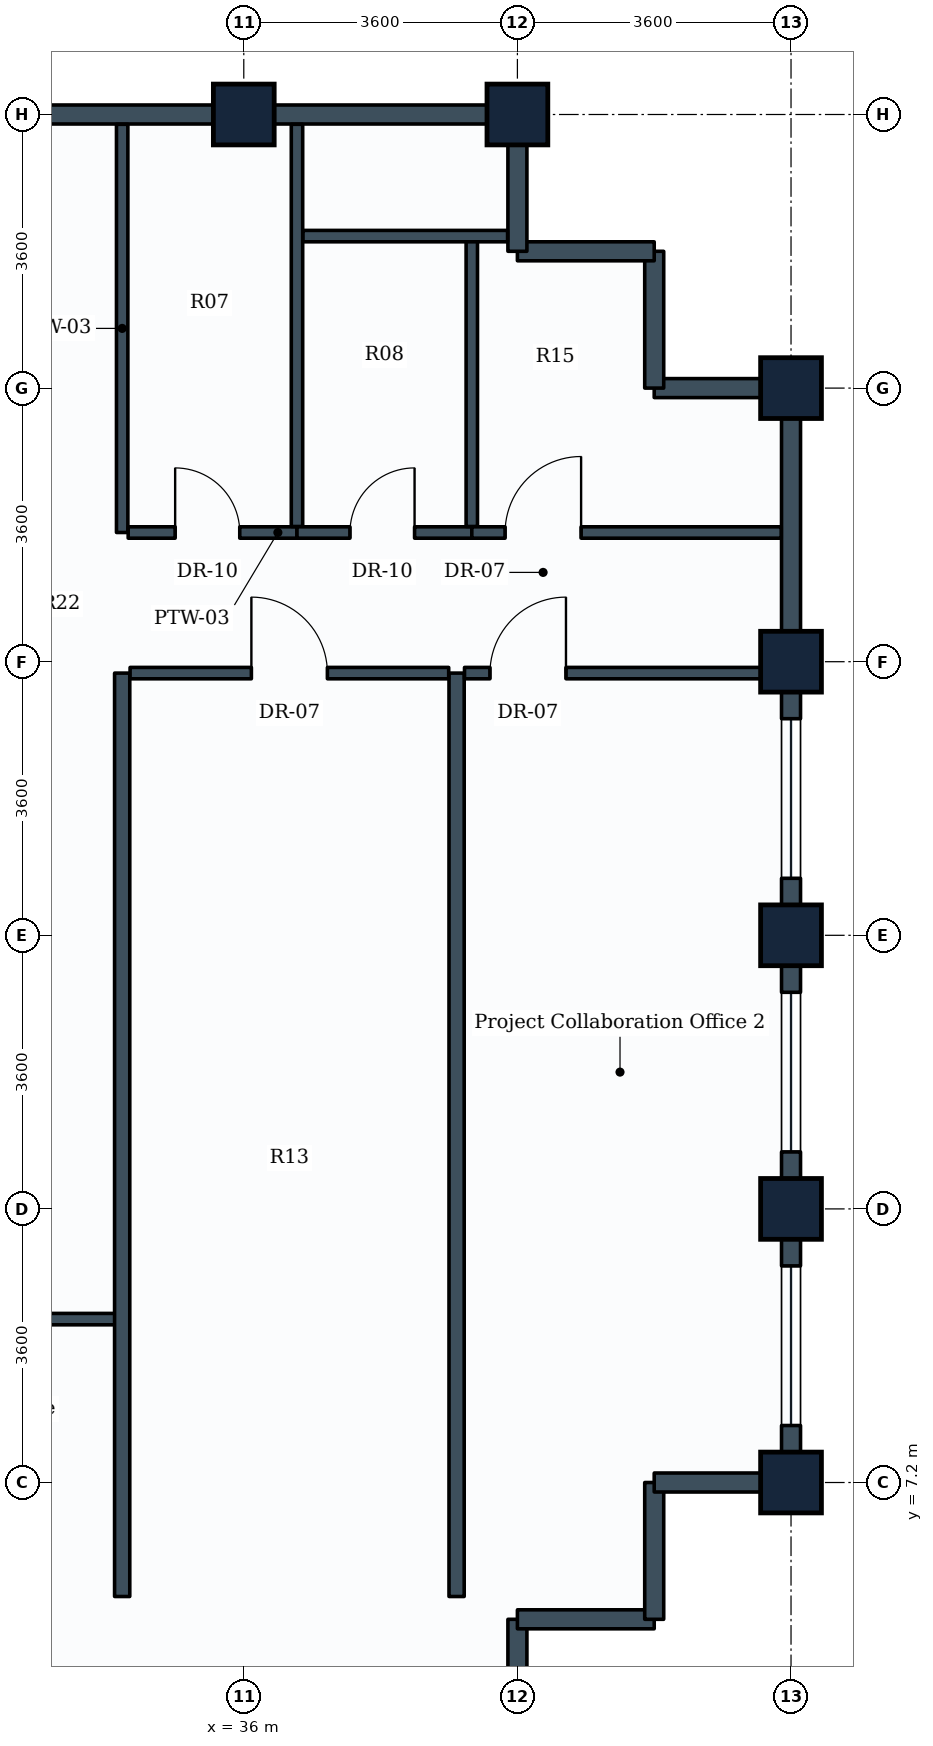
"""IFC4 building model, lengths in metres.
Left out: names, types, materials, properties, quantities, classifications, styles, units other than length and angle.
Written with IfcOpenShell. Run it as: python <this file> out.ifc"""

import sys

from ifc_helpers import new_model, si_unit, direction, frame, frame_2d, origin, origin_2d, place, context, subcontext, project, spatial, rectangle, extrude, element, fill, save


model = new_model("IFC4")
c1 = context("Model", 3, precision=1e-05, world=origin(), true_north=direction((0.0, 1.0)))
c2 = subcontext(c1, "Body", "Model", "MODEL_VIEW")
j1 = project(units=[si_unit("LENGTHUNIT", "METRE"), si_unit("PLANEANGLEUNIT", "RADIAN")], contexts=[c1])
p1 = place(None, origin())
s1 = spatial("IfcSite", under=j1, at=p1, CompositionType="ELEMENT")
p2 = place(p1, origin())
s2 = spatial("IfcBuilding", under=s1, at=p2, CompositionType="ELEMENT")
p3 = place(p2, frame((0.0, 0.0, 277.4)))
s3 = spatial("IfcBuildingStorey", under=s2, at=p3, CompositionType="ELEMENT", Elevation=277.4)
for number, where, z_axis, x_axis in (
    (1, (36.0, 25.2, 0.0), (0.0, 0.0, 1.0), (1.0, 0.0, 0.0)),
    (2, (39.6, 25.2, 0.0), (0.0, 0.0, 1.0), (1.0, 0.0, 0.0)),
    (3, (43.2, 7.2, 0.0), (0.0, 0.0, 1.0), (1.0, 0.0, 0.0)),
    (4, (43.2, 10.8, 0.0), (0.0, 0.0, 1.0), (0.0, 1.0, 0.0)),
    (5, (43.2, 14.4, 0.0), (0.0, 0.0, 1.0), (0.0, 1.0, 0.0)),
    (6, (43.2, 18.0, 0.0), (0.0, 0.0, 1.0), (0.0, 1.0, 0.0)),
    (7, (43.2, 21.6, 0.0), (0.0, 0.0, 1.0), (0.0, 1.0, 0.0)),
):
    element("IfcColumn", number, at=place(p3, frame(where, z_axis=z_axis, x_axis=x_axis)), inside=s3, PredefinedType="COLUMN", context=c2, shape_type="SweptSolid", body=[
        extrude(rectangle(XDim=0.8, YDim=0.8, at=origin_2d()), origin(), (0.0, 0.0, 1.0), 3.6),
    ])
p4 = place(p3, frame((39.6, 5.4, 0.0), z_axis=(0.0, 0.0, 1.0), x_axis=(0.0, -1.0, 0.0)))
e8 = element("IfcWall", 8, at=p4, inside=s3, PredefinedType="STANDARD", context=c2, shape_type="SweptSolid", body=[
    extrude(rectangle(XDim=1.8, YDim=0.25, at=frame_2d((0.9, 0.0))), origin(), (0.0, 0.0, 1.0), 2.83),
])
p5 = place(p3, frame((41.4, 5.4, 0.0), z_axis=(0.0, 0.0, 1.0), x_axis=(-1.0, 0.0, 0.0)))
e9 = element("IfcWall", 9, at=p5, inside=s3, PredefinedType="STANDARD", context=c2, shape_type="SweptSolid", body=[
    extrude(rectangle(XDim=1.8, YDim=0.25, at=frame_2d((0.9, 0.0))), origin(), (0.0, 0.0, 1.0), 3.335),
])
p6 = place(p3, frame((41.4, 7.2, 0.0), z_axis=(0.0, 0.0, 1.0), x_axis=(0.0, -1.0, 0.0)))
e10 = element("IfcWall", 10, at=p6, inside=s3, PredefinedType="STANDARD", context=c2, shape_type="SweptSolid", body=[
    extrude(rectangle(XDim=1.8, YDim=0.25, at=frame_2d((0.9, 0.0))), origin(), (0.0, 0.0, 1.0), 3.335),
])
p7 = place(p3, frame((43.2, 7.2, 0.0), z_axis=(0.0, 0.0, 1.0), x_axis=(-1.0, 0.0, 0.0)))
e11 = element("IfcWall", 11, at=p7, inside=s3, PredefinedType="STANDARD", context=c2, shape_type="SweptSolid", body=[
    extrude(rectangle(XDim=1.8, YDim=0.25, at=frame_2d((0.9, 0.0))), origin(), (0.0, 0.0, 1.0), 2.83),
])
p8 = place(p3, frame((43.2, 10.8, 0.0), z_axis=(0.0, 0.0, 1.0), x_axis=(0.0, -1.0, 0.0)))
e12 = element("IfcWall", 12, at=p8, inside=s3, PredefinedType="STANDARD", context=c2, shape_type="SweptSolid", body=[
    extrude(rectangle(XDim=3.6, YDim=0.25, at=frame_2d((1.8, 0.0))), origin(), (0.0, 0.0, 1.0), 2.83),
])
p9 = place(p8, frame((0.75, 0.0, 0.85)))
e13 = element("IfcOpeningElement", 13, at=p9, cuts=e12, PredefinedType="OPENING", context=c2, shape_type="SweptSolid", body=[
    extrude(rectangle(XDim=2.1, YDim=1.35, at=frame_2d((1.05, 0.675))), frame((0.0, 0.135, 0.0), z_axis=(0.0, -1.0, 0.0), x_axis=(1.0, 0.0, 0.0)), (0.0, 0.0, 1.0), 0.27),
])
p10 = place(p3, frame((43.2, 14.4, 0.0), z_axis=(0.0, 0.0, 1.0), x_axis=(0.0, -1.0, 0.0)))
e14 = element("IfcWall", 14, at=p10, inside=s3, PredefinedType="STANDARD", context=c2, shape_type="SweptSolid", body=[
    extrude(rectangle(XDim=3.6, YDim=0.25, at=frame_2d((1.8, 0.0))), origin(), (0.0, 0.0, 1.0), 2.83),
])
p11 = place(p10, frame((0.75, 0.0, 0.85)))
e15 = element("IfcOpeningElement", 15, at=p11, cuts=e14, PredefinedType="OPENING", context=c2, shape_type="SweptSolid", body=[
    extrude(rectangle(XDim=2.1, YDim=1.35, at=frame_2d((1.05, 0.675))), frame((0.0, 0.135, 0.0), z_axis=(0.0, -1.0, 0.0), x_axis=(1.0, 0.0, 0.0)), (0.0, 0.0, 1.0), 0.27),
])
p12 = place(p3, frame((43.2, 18.0, 0.0), z_axis=(0.0, 0.0, 1.0), x_axis=(0.0, -1.0, 0.0)))
e16 = element("IfcWall", 16, at=p12, inside=s3, PredefinedType="STANDARD", context=c2, shape_type="SweptSolid", body=[
    extrude(rectangle(XDim=3.6, YDim=0.25, at=frame_2d((1.8, 0.0))), origin(), (0.0, 0.0, 1.0), 2.83),
])
p13 = place(p12, frame((0.75, 0.0, 0.85)))
e17 = element("IfcOpeningElement", 17, at=p13, cuts=e16, PredefinedType="OPENING", context=c2, shape_type="SweptSolid", body=[
    extrude(rectangle(XDim=2.1, YDim=1.35, at=frame_2d((1.05, 0.675))), frame((0.0, 0.135, 0.0), z_axis=(0.0, -1.0, 0.0), x_axis=(1.0, 0.0, 0.0)), (0.0, 0.0, 1.0), 0.27),
])
p14 = place(p3, frame((43.2, 21.6, 0.0), z_axis=(0.0, 0.0, 1.0), x_axis=(0.0, -1.0, 0.0)))
e18 = element("IfcWall", 18, at=p14, inside=s3, PredefinedType="STANDARD", context=c2, shape_type="SweptSolid", body=[
    extrude(rectangle(XDim=3.6, YDim=0.25, at=frame_2d((1.8, 0.0))), origin(), (0.0, 0.0, 1.0), 2.83),
])
p15 = place(p3, frame((41.4, 21.6, 0.0), z_axis=(0.0, 0.0, 1.0), x_axis=(1.0, 0.0, 0.0)))
e19 = element("IfcWall", 19, at=p15, inside=s3, PredefinedType="STANDARD", context=c2, shape_type="SweptSolid", body=[
    extrude(rectangle(XDim=1.8, YDim=0.25, at=frame_2d((0.9, 0.0))), origin(), (0.0, 0.0, 1.0), 2.83),
])
for number, where, z_axis, x_axis in (
    (20, (41.4, 23.4, 0.0), (0.0, 0.0, 1.0), (0.0, -1.0, 0.0)),
    (21, (39.6, 23.4, 0.0), (0.0, 0.0, 1.0), (1.0, 0.0, 0.0)),
):
    element("IfcWall", number, at=place(p3, frame(where, z_axis=z_axis, x_axis=x_axis)), inside=s3, PredefinedType="STANDARD", context=c2, shape_type="SweptSolid", body=[
        extrude(rectangle(XDim=1.8, YDim=0.25, at=frame_2d((0.9, 0.0))), origin(), (0.0, 0.0, 1.0), 3.335),
    ])
p16 = place(p3, frame((39.6, 25.2, 0.0), z_axis=(0.0, 0.0, 1.0), x_axis=(0.0, -1.0, 0.0)))
e22 = element("IfcWall", 22, at=p16, inside=s3, PredefinedType="STANDARD", context=c2, shape_type="SweptSolid", body=[
    extrude(rectangle(XDim=1.8, YDim=0.25, at=frame_2d((0.9, 0.0))), origin(), (0.0, 0.0, 1.0), 2.83),
])
for number, where, z_axis, x_axis in (
    (23, (36.0, 25.2, 0.0), (0.0, 0.0, 1.0), (1.0, 0.0, 0.0)),
    (24, (32.4, 25.2, 0.0), (0.0, 0.0, 1.0), (1.0, 0.0, 0.0)),
):
    element("IfcWall", number, at=place(p3, frame(where, z_axis=z_axis, x_axis=x_axis)), inside=s3, PredefinedType="STANDARD", context=c2, shape_type="SweptSolid", body=[
        extrude(rectangle(XDim=3.6, YDim=0.25, at=frame_2d((1.8, 0.0))), origin(), (0.0, 0.0, 1.0), 2.83),
    ])
p17 = place(p3, frame((34.4, 19.7, 0.0), z_axis=(0.0, 0.0, 1.0), x_axis=(0.0, 1.0, 0.0)))
e25 = element("IfcWall", 25, at=p17, inside=s3, PredefinedType="PARTITIONING", context=c2, shape_type="SweptSolid", body=[
    extrude(rectangle(XDim=5.371, YDim=0.15, at=frame_2d((2.686, 0.0))), origin(), (0.0, 0.0, 1.0), 2.83),
])
p18 = place(p3, frame((34.479, 19.7, 0.0), z_axis=(0.0, 0.0, 1.0), x_axis=(1.0, 0.0, 0.0)))
e26 = element("IfcWall", 26, at=p18, inside=s3, PredefinedType="PARTITIONING", context=c2, shape_type="SweptSolid", body=[
    extrude(rectangle(XDim=2.221, YDim=0.15, at=frame_2d((1.11, 0.0))), origin(), (0.0, 0.0, 1.0), 3.02),
])
p19 = place(p18, frame((0.618, 0.0, 0.0)))
e27 = element("IfcOpeningElement", 27, at=p19, cuts=e26, PredefinedType="OPENING", context=c2, shape_type="SweptSolid", body=[
    extrude(rectangle(XDim=0.85, YDim=2.1, at=frame_2d((0.425, 1.05))), frame((0.0, 0.085, 0.0), z_axis=(0.0, -1.0, 0.0), x_axis=(1.0, 0.0, 0.0)), (0.0, 0.0, 1.0), 0.17),
])
p20 = place(p3, frame((36.7, 19.779, 0.0), z_axis=(0.0, 0.0, 1.0), x_axis=(0.0, 1.0, 0.0)))
e28 = element("IfcWall", 28, at=p20, inside=s3, PredefinedType="PARTITIONING", context=c2, shape_type="SweptSolid", body=[
    extrude(rectangle(XDim=5.292, YDim=0.15, at=frame_2d((2.646, 0.0))), origin(), (0.0, 0.0, 1.0), 2.83),
])
p21 = place(p3, frame((36.7, 19.7, 0.0), z_axis=(0.0, 0.0, 1.0), x_axis=(1.0, 0.0, 0.0)))
e29 = element("IfcWall", 29, at=p21, inside=s3, PredefinedType="PARTITIONING", context=c2, shape_type="SweptSolid", body=[
    extrude(rectangle(XDim=2.3, YDim=0.15, at=frame_2d((1.15, 0.0))), origin(), (0.0, 0.0, 1.0), 3.335),
])
p22 = place(p21, frame((0.697, 0.0, 0.0)))
e30 = element("IfcOpeningElement", 30, at=p22, cuts=e29, PredefinedType="OPENING", context=c2, shape_type="SweptSolid", body=[
    extrude(rectangle(XDim=0.85, YDim=2.1, at=frame_2d((0.425, 1.05))), frame((0.0, 0.085, 0.0), z_axis=(0.0, -1.0, 0.0), x_axis=(1.0, 0.0, 0.0)), (0.0, 0.0, 1.0), 0.17),
])
p23 = place(p3, frame((39.0, 19.779, 0.0), z_axis=(0.0, 0.0, 1.0), x_axis=(0.0, 1.0, 0.0)))
e31 = element("IfcWall", 31, at=p23, inside=s3, PredefinedType="PARTITIONING", context=c2, shape_type="SweptSolid", body=[
    extrude(rectangle(XDim=3.821, YDim=0.15, at=frame_2d((1.911, 0.0))), origin(), (0.0, 0.0, 1.0), 3.335),
])
p24 = place(p3, frame((36.779, 23.6, 0.0), z_axis=(0.0, 0.0, 1.0), x_axis=(1.0, 0.0, 0.0)))
e32 = element("IfcWall", 32, at=p24, inside=s3, PredefinedType="PARTITIONING", context=c2, shape_type="SweptSolid", body=[
    extrude(rectangle(XDim=2.692, YDim=0.15, at=frame_2d((1.346, 0.0))), origin(), (0.0, 0.0, 1.0), 3.335),
])
p25 = place(p3, frame((28.879, 9.35, 0.0), z_axis=(0.0, 0.0, 1.0), x_axis=(1.0, 0.0, 0.0)))
e33 = element("IfcWall", 33, at=p25, inside=s3, PredefinedType="PARTITIONING", context=c2, shape_type="SweptSolid", body=[
    extrude(rectangle(XDim=5.521, YDim=0.15, at=frame_2d((2.76, 0.0))), origin(), (0.0, 0.0, 1.0), 3.335),
])
p26 = place(p25, frame((0.36, 0.0, 0.0)))
e34 = element("IfcOpeningElement", 34, at=p26, cuts=e33, PredefinedType="OPENING", context=c2, shape_type="SweptSolid", body=[
    extrude(rectangle(XDim=1.0, YDim=2.1, at=frame_2d((0.5, 1.05))), frame((0.0, 0.085, 0.0), z_axis=(0.0, -1.0, 0.0), x_axis=(1.0, 0.0, 0.0)), (0.0, 0.0, 1.0), 0.17),
])
for number, where, z_axis, x_axis in (
    (35, (34.4, 5.7, 0.0), (0.0, 0.0, 1.0), (0.0, 1.0, 0.0)),
    (36, (38.8, 5.7, 0.0), (0.0, 0.0, 1.0), (0.0, 1.0, 0.0)),
):
    element("IfcWall", number, at=place(p3, frame(where, z_axis=z_axis, x_axis=x_axis)), inside=s3, PredefinedType="PARTITIONING", context=c2, shape_type="SweptSolid", body=[
        extrude(rectangle(XDim=12.15, YDim=0.2, at=frame_2d((6.075, 0.0))), origin(), (0.0, 0.0, 1.0), 3.03),
    ])
p27 = place(p3, frame((34.504, 17.85, 0.0), z_axis=(0.0, 0.0, 1.0), x_axis=(1.0, 0.0, 0.0)))
e37 = element("IfcWall", 37, at=p27, inside=s3, PredefinedType="PARTITIONING", context=c2, shape_type="SweptSolid", body=[
    extrude(rectangle(XDim=4.192, YDim=0.15, at=frame_2d((2.096, 0.0))), origin(), (0.0, 0.0, 1.0), 3.02),
])
p28 = place(p27, frame((1.596, 0.0, 0.0)))
e38 = element("IfcOpeningElement", 38, at=p28, cuts=e37, PredefinedType="OPENING", context=c2, shape_type="SweptSolid", body=[
    extrude(rectangle(XDim=1.0, YDim=2.1, at=frame_2d((0.5, 1.05))), frame((0.0, 0.085, 0.0), z_axis=(0.0, -1.0, 0.0), x_axis=(1.0, 0.0, 0.0)), (0.0, 0.0, 1.0), 0.17),
])
p29 = place(p3, frame((38.904, 17.85, 0.0), z_axis=(0.0, 0.0, 1.0), x_axis=(1.0, 0.0, 0.0)))
e39 = element("IfcWall", 39, at=p29, inside=s3, PredefinedType="PARTITIONING", context=c2, shape_type="SweptSolid", body=[
    extrude(rectangle(XDim=4.167, YDim=0.15, at=frame_2d((2.083, 0.0))), origin(), (0.0, 0.0, 1.0), 2.83),
])
p30 = place(p29, frame((0.335, 0.0, 0.0)))
e40 = element("IfcOpeningElement", 40, at=p30, cuts=e39, PredefinedType="OPENING", context=c2, shape_type="SweptSolid", body=[
    extrude(rectangle(XDim=1.0, YDim=2.1, at=frame_2d((0.5, 1.05))), frame((0.0, 0.085, 0.0), z_axis=(0.0, -1.0, 0.0), x_axis=(1.0, 0.0, 0.0)), (0.0, 0.0, 1.0), 0.17),
])
p31 = place(p3, frame((39.0, 19.7, 0.0), z_axis=(0.0, 0.0, 1.0), x_axis=(1.0, 0.0, 0.0)))
e41 = element("IfcWall", 41, at=p31, inside=s3, PredefinedType="PARTITIONING", context=c2, shape_type="SweptSolid", body=[
    extrude(rectangle(XDim=4.071, YDim=0.15, at=frame_2d((2.036, 0.0))), origin(), (0.0, 0.0, 1.0), 2.83),
])
p32 = place(p31, frame((0.438, 0.0, 0.0)))
e42 = element("IfcOpeningElement", 42, at=p32, cuts=e41, PredefinedType="OPENING", context=c2, shape_type="SweptSolid", body=[
    extrude(rectangle(XDim=1.0, YDim=2.1, at=frame_2d((0.5, 1.05))), frame((0.0, 0.085, 0.0), z_axis=(0.0, -1.0, 0.0), x_axis=(1.0, 0.0, 0.0)), (0.0, 0.0, 1.0), 0.17),
])
p33 = place(p9, origin())
e43 = element("IfcWindow", 43, at=p33, inside=s3, PartitioningType="SINGLE_PANEL", PredefinedType="WINDOW", context=c2, shape_type="SweptSolid", body=[
    extrude(rectangle(XDim=2.1, YDim=1.35, at=frame_2d((1.05, 0.675))), frame((0.0, 0.03, 0.0), z_axis=(0.0, -1.0, 0.0), x_axis=(1.0, 0.0, 0.0)), (0.0, 0.0, 1.0), 0.06),
])
fill(e13, e43)
p34 = place(p11, origin())
e44 = element("IfcWindow", 44, at=p34, inside=s3, PartitioningType="SINGLE_PANEL", PredefinedType="WINDOW", context=c2, shape_type="SweptSolid", body=[
    extrude(rectangle(XDim=2.1, YDim=1.35, at=frame_2d((1.05, 0.675))), frame((0.0, 0.03, 0.0), z_axis=(0.0, -1.0, 0.0), x_axis=(1.0, 0.0, 0.0)), (0.0, 0.0, 1.0), 0.06),
])
fill(e15, e44)
p35 = place(p13, origin())
e45 = element("IfcWindow", 45, at=p35, inside=s3, PartitioningType="SINGLE_PANEL", PredefinedType="WINDOW", context=c2, shape_type="SweptSolid", body=[
    extrude(rectangle(XDim=2.1, YDim=1.35, at=frame_2d((1.05, 0.675))), frame((0.0, 0.03, 0.0), z_axis=(0.0, -1.0, 0.0), x_axis=(1.0, 0.0, 0.0)), (0.0, 0.0, 1.0), 0.06),
])
fill(e17, e45)
p36 = place(p19, origin())
e46 = element("IfcDoor", 46, at=p36, inside=s3, OperationType="SINGLE_SWING_LEFT", PredefinedType="DOOR", context=c2, shape_type="SweptSolid", body=[
    extrude(rectangle(XDim=0.85, YDim=2.1, at=frame_2d((0.425, 1.05))), frame((0.0, 0.025, 0.0), z_axis=(0.0, -1.0, 0.0), x_axis=(1.0, 0.0, 0.0)), (0.0, 0.0, 1.0), 0.05),
])
fill(e27, e46)
p37 = place(p22, origin())
e47 = element("IfcDoor", 47, at=p37, inside=s3, OperationType="SINGLE_SWING_RIGHT", PredefinedType="DOOR", context=c2, shape_type="SweptSolid", body=[
    extrude(rectangle(XDim=0.85, YDim=2.1, at=frame_2d((0.425, 1.05))), frame((0.0, 0.025, 0.0), z_axis=(0.0, -1.0, 0.0), x_axis=(1.0, 0.0, 0.0)), (0.0, 0.0, 1.0), 0.05),
])
fill(e30, e47)
p38 = place(p28, origin())
e48 = element("IfcDoor", 48, at=p38, inside=s3, OperationType="SINGLE_SWING_LEFT", PredefinedType="DOOR", context=c2, shape_type="SweptSolid", body=[
    extrude(rectangle(XDim=1.0, YDim=2.1, at=frame_2d((0.5, 1.05))), frame((0.0, 0.025, 0.0), z_axis=(0.0, -1.0, 0.0), x_axis=(1.0, 0.0, 0.0)), (0.0, 0.0, 1.0), 0.05),
])
fill(e38, e48)
p39 = place(p30, origin())
e49 = element("IfcDoor", 49, at=p39, inside=s3, OperationType="SINGLE_SWING_RIGHT", PredefinedType="DOOR", context=c2, shape_type="SweptSolid", body=[
    extrude(rectangle(XDim=1.0, YDim=2.1, at=frame_2d((0.5, 1.05))), frame((0.0, 0.025, 0.0), z_axis=(0.0, -1.0, 0.0), x_axis=(1.0, 0.0, 0.0)), (0.0, 0.0, 1.0), 0.05),
])
fill(e40, e49)
p40 = place(p32, origin())
e50 = element("IfcDoor", 50, at=p40, inside=s3, OperationType="SINGLE_SWING_RIGHT", PredefinedType="DOOR", context=c2, shape_type="SweptSolid", body=[
    extrude(rectangle(XDim=1.0, YDim=2.1, at=frame_2d((0.5, 1.05))), frame((0.0, 0.025, 0.0), z_axis=(0.0, -1.0, 0.0), x_axis=(1.0, 0.0, 0.0)), (0.0, 0.0, 1.0), 0.05),
])
fill(e42, e50)
save(model, sys.argv[1])
